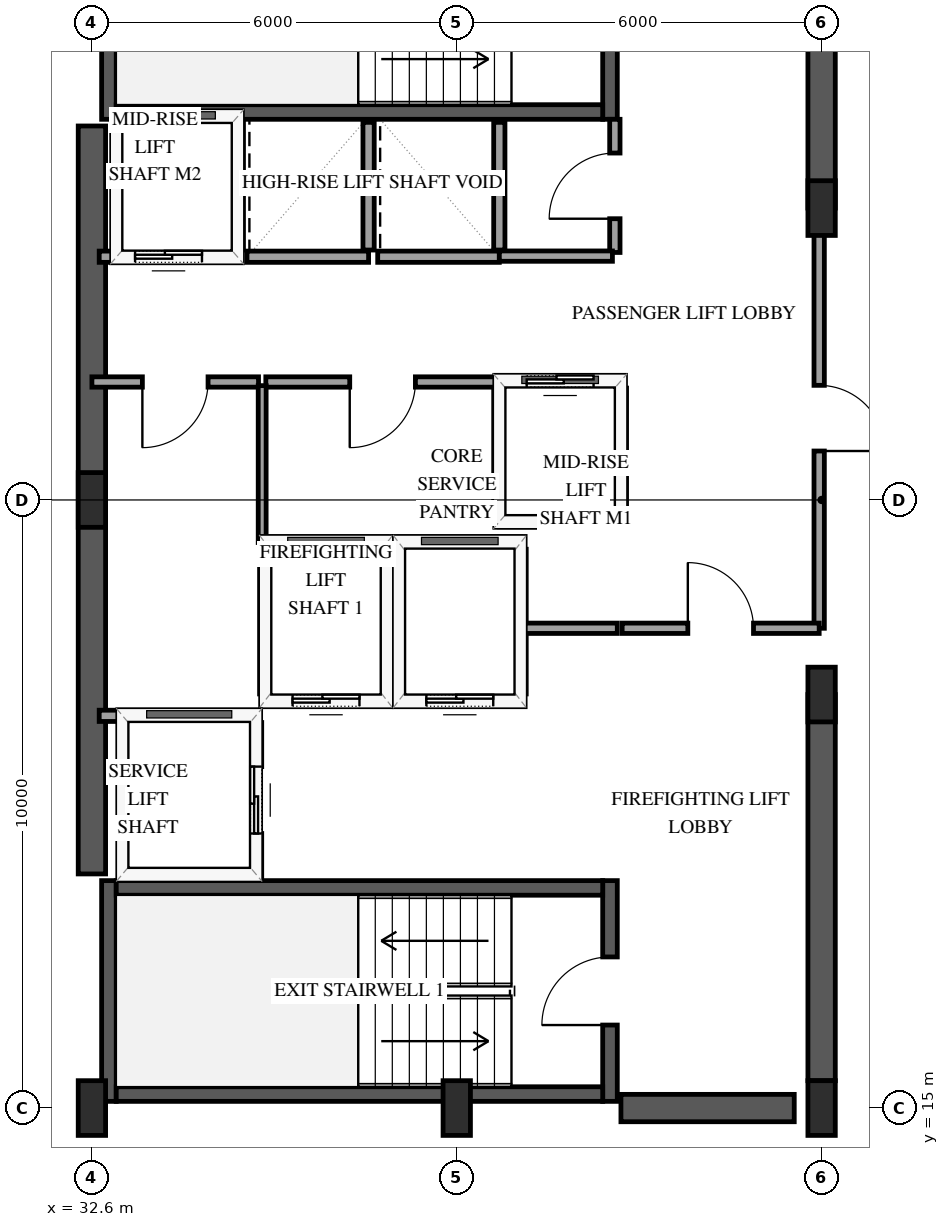
"""IFC4 building model, lengths in metres.
Left out: names, types, materials, properties, quantities, classifications, styles, units other than length and angle.
Written with IfcOpenShell. Run it as: python <this file> out.ifc"""

import sys

from ifc_helpers import new_model, si_unit, direction, frame, frame_2d, origin, origin_2d, place, context, subcontext, project, spatial, rectangle, extrude, element, fill, save


model = new_model("IFC4")
c1 = context("Model", 3, precision=1e-05, world=origin(), true_north=direction((0.0, 1.0)))
c2 = subcontext(c1, "Body", "Model", "MODEL_VIEW")
j1 = project(units=[si_unit("LENGTHUNIT", "METRE"), si_unit("PLANEANGLEUNIT", "RADIAN")], contexts=[c1])
p1 = place(None, origin())
s1 = spatial("IfcSite", under=j1, at=p1, CompositionType="ELEMENT")
p2 = place(p1, origin())
s2 = spatial("IfcBuilding", under=s1, at=p2, CompositionType="ELEMENT")
p3 = place(p2, frame((0.0, 0.0, 223.0)))
s3 = spatial("IfcBuildingStorey", under=s2, at=p3, CompositionType="ELEMENT", Elevation=223.0)
p4 = place(p3, frame((32.88, 15.11, 0.0), z_axis=(0.0, 0.0, 1.0), x_axis=(0.0, 1.0, 0.0)))
e1 = element("IfcWall", 1, at=p4, inside=s3, PredefinedType="SHEAR", context=c2, shape_type="SweptSolid", body=[
    extrude(rectangle(XDim=3.63, YDim=0.24, at=frame_2d((1.815, 0.0))), origin(), (0.0, 0.0, 1.0), 3.6),
])
p5 = place(p3, frame((41.12, 15.11, 0.0), z_axis=(0.0, 0.0, 1.0), x_axis=(0.0, 1.0, 0.0)))
e2 = element("IfcWall", 2, at=p5, inside=s3, PredefinedType="SHEAR", context=c2, shape_type="SweptSolid", body=[
    extrude(rectangle(XDim=3.63, YDim=0.24, at=frame_2d((1.815, 0.0))), origin(), (0.0, 0.0, 1.0), 3.6),
])
p6 = place(p5, frame((1.255, 0.0, 0.0)))
e3 = element("IfcOpeningElement", 3, at=p6, cuts=e2, PredefinedType="OPENING", context=c2, shape_type="SweptSolid", body=[
    extrude(rectangle(XDim=1.12, YDim=2.15, at=frame_2d((0.56, 1.075))), frame((0.0, 0.13, 0.0), z_axis=(0.0, -1.0, 0.0), x_axis=(1.0, 0.0, 0.0)), (0.0, 0.0, 1.0), 0.26),
])
for number, where, z_axis, x_axis in (
    (4, (33.0, 15.23, 0.0), (0.0, 0.0, 1.0), (1.0, 0.0, 0.0)),
    (5, (33.0, 18.62, 0.0), (0.0, 0.0, 1.0), (1.0, 0.0, 0.0)),
):
    element("IfcWall", number, at=place(p3, frame(where, z_axis=z_axis, x_axis=x_axis)), inside=s3, PredefinedType="SHEAR", context=c2, shape_type="SweptSolid", body=[
        extrude(rectangle(XDim=8.0, YDim=0.24, at=frame_2d((4.0, 0.0))), origin(), (0.0, 0.0, 1.0), 3.6),
    ])
p7 = place(p3, frame((32.88, 31.26, 0.0), z_axis=(0.0, 0.0, 1.0), x_axis=(0.0, 1.0, 0.0)))
e6 = element("IfcWall", 6, at=p7, inside=s3, PredefinedType="SHEAR", context=c2, shape_type="SweptSolid", body=[
    extrude(rectangle(XDim=3.63, YDim=0.24, at=frame_2d((1.815, 0.0))), origin(), (0.0, 0.0, 1.0), 3.6),
])
p8 = place(p3, frame((41.12, 31.26, 0.0), z_axis=(0.0, 0.0, 1.0), x_axis=(0.0, 1.0, 0.0)))
e7 = element("IfcWall", 7, at=p8, inside=s3, PredefinedType="SHEAR", context=c2, shape_type="SweptSolid", body=[
    extrude(rectangle(XDim=3.63, YDim=0.24, at=frame_2d((1.815, 0.0))), origin(), (0.0, 0.0, 1.0), 3.6),
])
p9 = place(p8, frame((1.255, 0.0, 0.0)))
e8 = element("IfcOpeningElement", 8, at=p9, cuts=e7, PredefinedType="OPENING", context=c2, shape_type="SweptSolid", body=[
    extrude(rectangle(XDim=1.12, YDim=2.15, at=frame_2d((0.56, 1.075))), frame((0.0, 0.13, 0.0), z_axis=(0.0, -1.0, 0.0), x_axis=(1.0, 0.0, 0.0)), (0.0, 0.0, 1.0), 0.26),
])
p10 = place(p3, frame((33.0, 31.38, 0.0), z_axis=(0.0, 0.0, 1.0), x_axis=(1.0, 0.0, 0.0)))
e9 = element("IfcWall", 9, at=p10, inside=s3, PredefinedType="SHEAR", context=c2, shape_type="SweptSolid", body=[
    extrude(rectangle(XDim=8.0, YDim=0.24, at=frame_2d((4.0, 0.0))), origin(), (0.0, 0.0, 1.0), 3.6),
])
p11 = place(p3, frame((32.6, 18.85, 0.0), z_axis=(0.0, 0.0, 1.0), x_axis=(0.0, 1.0, 0.0)))
e10 = element("IfcWall", 10, at=p11, inside=s3, PredefinedType="SHEAR", context=c2, shape_type="SweptSolid", body=[
    extrude(rectangle(XDim=12.3, YDim=0.45, at=frame_2d((6.15, 0.0))), origin(), (0.0, 0.0, 1.0), 3.6),
])
p12 = place(p3, frame((41.3, 15.0, 0.0), z_axis=(0.0, 0.0, 1.0), x_axis=(1.0, 0.0, 0.0)))
e11 = element("IfcWall", 11, at=p12, inside=s3, PredefinedType="SHEAR", context=c2, shape_type="SweptSolid", body=[
    extrude(rectangle(XDim=2.85, YDim=0.45, at=frame_2d((1.425, 0.0))), origin(), (0.0, 0.0, 1.0), 3.6),
])
p13 = place(p3, frame((44.6, 15.45, 0.0), z_axis=(0.0, 0.0, 1.0), x_axis=(0.0, 1.0, 0.0)))
e12 = element("IfcWall", 12, at=p13, inside=s3, PredefinedType="SHEAR", context=c2, shape_type="SweptSolid", body=[
    extrude(rectangle(XDim=6.35, YDim=0.45, at=frame_2d((3.175, 0.0))), origin(), (0.0, 0.0, 1.0), 3.6),
])
p14 = place(p3, frame((44.6, 29.8, 0.0), z_axis=(0.0, 0.0, 1.0), x_axis=(0.0, 1.0, 0.0)))
e13 = element("IfcWall", 13, at=p14, inside=s3, PredefinedType="SHEAR", context=c2, shape_type="SweptSolid", body=[
    extrude(rectangle(XDim=4.75, YDim=0.45, at=frame_2d((2.375, 0.0))), origin(), (0.0, 0.0, 1.0), 3.6),
])
for number, where, z_axis, x_axis in (
    (14, (32.6, 15.0, 0.0), (0.0, 0.0, 1.0), (1.0, 0.0, 0.0)),
    (15, (32.6, 25.0, 0.0), (0.0, 0.0, 1.0), (1.0, 0.0, 0.0)),
    (16, (38.6, 15.0, 0.0), (0.0, 0.0, 1.0), (1.0, 0.0, 0.0)),
    (17, (44.6, 15.0, 0.0), (0.0, 0.0, 1.0), (1.0, 0.0, 0.0)),
    (18, (44.6, 21.8, 0.0), (0.0, 0.0, 1.0), (1.0, 0.0, 0.0)),
    (19, (44.6, 29.8, 0.0), (0.0, 0.0, 1.0), (1.0, 0.0, 0.0)),
):
    element("IfcColumn", number, at=place(p3, frame(where, z_axis=z_axis, x_axis=x_axis)), inside=s3, PredefinedType="PILASTER", context=c2, shape_type="SweptSolid", body=[
        extrude(rectangle(XDim=0.45, YDim=0.9, at=origin_2d()), origin(), (0.0, 0.0, 1.0), 3.6),
    ])
p15 = place(p3, frame((35.45, 21.7, 0.0), z_axis=(0.0, 0.0, 1.0), x_axis=(1.0, 0.0, 0.0)))
e20 = element("IfcWall", 20, at=p15, inside=s3, PredefinedType="SOLIDWALL", context=c2, shape_type="SweptSolid", body=[
    extrude(rectangle(XDim=2.0, YDim=0.185, at=frame_2d((1.0, 0.0))), origin(), (0.0, 0.0, 1.0), 3.3),
])
p16 = place(p15, frame((0.45, 0.0, 0.0)))
e21 = element("IfcOpeningElement", 21, at=p16, cuts=e20, PredefinedType="OPENING", context=c2, shape_type="SweptSolid", body=[
    extrude(rectangle(XDim=1.1, YDim=2.15, at=frame_2d((0.55, 1.075))), frame((0.0, 0.103, 0.0), z_axis=(0.0, -1.0, 0.0), x_axis=(1.0, 0.0, 0.0)), (0.0, 0.0, 1.0), 0.205),
])
p17 = place(p3, frame((35.45, 24.3, 0.0), z_axis=(0.0, 0.0, 1.0), x_axis=(1.0, 0.0, 0.0)))
e22 = element("IfcWall", 22, at=p17, inside=s3, PredefinedType="SOLIDWALL", context=c2, shape_type="SweptSolid", body=[
    extrude(rectangle(XDim=2.0, YDim=0.185, at=frame_2d((1.0, 0.0))), origin(), (0.0, 0.0, 1.0), 3.3),
])
for number, where, z_axis, x_axis in (
    (23, (35.45, 21.81, 0.0), (0.0, 0.0, 1.0), (0.0, 1.0, 0.0)),
    (24, (37.45, 21.81, 0.0), (0.0, 0.0, 1.0), (0.0, 1.0, 0.0)),
):
    element("IfcWall", number, at=place(p3, frame(where, z_axis=z_axis, x_axis=x_axis)), inside=s3, PredefinedType="SOLIDWALL", context=c2, shape_type="SweptSolid", body=[
        extrude(rectangle(XDim=2.38, YDim=0.185, at=frame_2d((1.19, 0.0))), origin(), (0.0, 0.0, 1.0), 3.3),
    ])
p18 = place(p3, frame((37.65, 21.7, 0.0), z_axis=(0.0, 0.0, 1.0), x_axis=(1.0, 0.0, 0.0)))
e25 = element("IfcWall", 25, at=p18, inside=s3, PredefinedType="SOLIDWALL", context=c2, shape_type="SweptSolid", body=[
    extrude(rectangle(XDim=2.0, YDim=0.185, at=frame_2d((1.0, 0.0))), origin(), (0.0, 0.0, 1.0), 3.3),
])
p19 = place(p18, frame((0.45, 0.0, 0.0)))
e26 = element("IfcOpeningElement", 26, at=p19, cuts=e25, PredefinedType="OPENING", context=c2, shape_type="SweptSolid", body=[
    extrude(rectangle(XDim=1.1, YDim=2.15, at=frame_2d((0.55, 1.075))), frame((0.0, 0.103, 0.0), z_axis=(0.0, -1.0, 0.0), x_axis=(1.0, 0.0, 0.0)), (0.0, 0.0, 1.0), 0.205),
])
p20 = place(p3, frame((37.65, 24.3, 0.0), z_axis=(0.0, 0.0, 1.0), x_axis=(1.0, 0.0, 0.0)))
e27 = element("IfcWall", 27, at=p20, inside=s3, PredefinedType="SOLIDWALL", context=c2, shape_type="SweptSolid", body=[
    extrude(rectangle(XDim=2.0, YDim=0.185, at=frame_2d((1.0, 0.0))), origin(), (0.0, 0.0, 1.0), 3.3),
])
p21 = place(p3, frame((39.65, 21.81, 0.0), z_axis=(0.0, 0.0, 1.0), x_axis=(0.0, 1.0, 0.0)))
e28 = element("IfcWall", 28, at=p21, inside=s3, PredefinedType="SOLIDWALL", context=c2, shape_type="SweptSolid", body=[
    extrude(rectangle(XDim=2.38, YDim=0.185, at=frame_2d((1.19, 0.0))), origin(), (0.0, 0.0, 1.0), 3.3),
])
p22 = place(p3, frame((32.72, 21.45, 0.0), z_axis=(0.0, 0.0, 1.0), x_axis=(1.0, 0.0, 0.0)))
e29 = element("IfcWall", 29, at=p22, inside=s3, PredefinedType="SOLIDWALL", context=c2, shape_type="SweptSolid", body=[
    extrude(rectangle(XDim=2.58, YDim=0.185, at=frame_2d((1.29, 0.0))), origin(), (0.0, 0.0, 1.0), 3.3),
])
p23 = place(p3, frame((35.3, 18.79, 0.0), z_axis=(0.0, 0.0, 1.0), x_axis=(0.0, 1.0, 0.0)))
e30 = element("IfcWall", 30, at=p23, inside=s3, PredefinedType="SOLIDWALL", context=c2, shape_type="SweptSolid", body=[
    extrude(rectangle(XDim=2.55, YDim=0.185, at=frame_2d((1.275, 0.0))), origin(), (0.0, 0.0, 1.0), 3.3),
])
p24 = place(p23, frame((0.725, 0.0, 0.0)))
e31 = element("IfcOpeningElement", 31, at=p24, cuts=e30, PredefinedType="OPENING", context=c2, shape_type="SweptSolid", body=[
    extrude(rectangle(XDim=1.1, YDim=2.15, at=frame_2d((0.55, 1.075))), frame((0.0, 0.103, 0.0), z_axis=(0.0, -1.0, 0.0), x_axis=(1.0, 0.0, 0.0)), (0.0, 0.0, 1.0), 0.205),
])
p25 = place(p3, frame((39.3, 24.65, 0.0), z_axis=(0.0, 0.0, 1.0), x_axis=(1.0, 0.0, 0.0)))
e32 = element("IfcWall", 32, at=p25, inside=s3, PredefinedType="SOLIDWALL", context=c2, shape_type="SweptSolid", body=[
    extrude(rectangle(XDim=2.0, YDim=0.185, at=frame_2d((1.0, 0.0))), origin(), (0.0, 0.0, 1.0), 3.3),
])
p26 = place(p3, frame((39.3, 26.95, 0.0), z_axis=(0.0, 0.0, 1.0), x_axis=(1.0, 0.0, 0.0)))
e33 = element("IfcWall", 33, at=p26, inside=s3, PredefinedType="SOLIDWALL", context=c2, shape_type="SweptSolid", body=[
    extrude(rectangle(XDim=2.0, YDim=0.185, at=frame_2d((1.0, 0.0))), origin(), (0.0, 0.0, 1.0), 3.3),
])
p27 = place(p26, frame((0.45, 0.0, 0.0)))
e34 = element("IfcOpeningElement", 34, at=p27, cuts=e33, PredefinedType="OPENING", context=c2, shape_type="SweptSolid", body=[
    extrude(rectangle(XDim=1.1, YDim=2.15, at=frame_2d((0.55, 1.075))), frame((0.0, 0.103, 0.0), z_axis=(0.0, -1.0, 0.0), x_axis=(1.0, 0.0, 0.0)), (0.0, 0.0, 1.0), 0.205),
])
for number, where, z_axis, x_axis in (
    (35, (39.3, 24.76, 0.0), (0.0, 0.0, 1.0), (0.0, 1.0, 0.0)),
    (36, (41.3, 24.76, 0.0), (0.0, 0.0, 1.0), (0.0, 1.0, 0.0)),
):
    element("IfcWall", number, at=place(p3, frame(where, z_axis=z_axis, x_axis=x_axis)), inside=s3, PredefinedType="SOLIDWALL", context=c2, shape_type="SweptSolid", body=[
        extrude(rectangle(XDim=2.08, YDim=0.185, at=frame_2d((1.04, 0.0))), origin(), (0.0, 0.0, 1.0), 3.3),
    ])
p28 = place(p3, frame((32.72, 29.0, 0.0), z_axis=(0.0, 0.0, 1.0), x_axis=(1.0, 0.0, 0.0)))
e37 = element("IfcWall", 37, at=p28, inside=s3, PredefinedType="SOLIDWALL", context=c2, shape_type="SweptSolid", body=[
    extrude(rectangle(XDim=2.28, YDim=0.185, at=frame_2d((1.14, 0.0))), origin(), (0.0, 0.0, 1.0), 3.3),
])
p29 = place(p28, frame((0.59, 0.0, 0.0)))
e38 = element("IfcOpeningElement", 38, at=p29, cuts=e37, PredefinedType="OPENING", context=c2, shape_type="SweptSolid", body=[
    extrude(rectangle(XDim=1.1, YDim=2.15, at=frame_2d((0.55, 1.075))), frame((0.0, 0.103, 0.0), z_axis=(0.0, -1.0, 0.0), x_axis=(1.0, 0.0, 0.0)), (0.0, 0.0, 1.0), 0.205),
])
p30 = place(p3, frame((35.0, 29.11, 0.0), z_axis=(0.0, 0.0, 1.0), x_axis=(0.0, 1.0, 0.0)))
e39 = element("IfcWall", 39, at=p30, inside=s3, PredefinedType="SOLIDWALL", context=c2, shape_type="SweptSolid", body=[
    extrude(rectangle(XDim=2.1, YDim=0.185, at=frame_2d((1.05, 0.0))), origin(), (0.0, 0.0, 1.0), 3.3),
])
p31 = place(p3, frame((35.15, 29.0, 0.0), z_axis=(0.0, 0.0, 1.0), x_axis=(1.0, 0.0, 0.0)))
e40 = element("IfcWall", 40, at=p31, inside=s3, PredefinedType="SOLIDWALL", context=c2, shape_type="SweptSolid", body=[
    extrude(rectangle(XDim=2.0, YDim=0.185, at=frame_2d((1.0, 0.0))), origin(), (0.0, 0.0, 1.0), 3.3),
])
p32 = place(p3, frame((37.15, 29.11, 0.0), z_axis=(0.0, 0.0, 1.0), x_axis=(0.0, 1.0, 0.0)))
e41 = element("IfcWall", 41, at=p32, inside=s3, PredefinedType="SOLIDWALL", context=c2, shape_type="SweptSolid", body=[
    extrude(rectangle(XDim=2.1, YDim=0.185, at=frame_2d((1.05, 0.0))), origin(), (0.0, 0.0, 1.0), 3.3),
])
p33 = place(p3, frame((37.3, 29.0, 0.0), z_axis=(0.0, 0.0, 1.0), x_axis=(1.0, 0.0, 0.0)))
e42 = element("IfcWall", 42, at=p33, inside=s3, PredefinedType="SOLIDWALL", context=c2, shape_type="SweptSolid", body=[
    extrude(rectangle(XDim=2.0, YDim=0.185, at=frame_2d((1.0, 0.0))), origin(), (0.0, 0.0, 1.0), 3.3),
])
p34 = place(p3, frame((39.3, 29.11, 0.0), z_axis=(0.0, 0.0, 1.0), x_axis=(0.0, 1.0, 0.0)))
e43 = element("IfcWall", 43, at=p34, inside=s3, PredefinedType="SOLIDWALL", context=c2, shape_type="SweptSolid", body=[
    extrude(rectangle(XDim=2.1, YDim=0.185, at=frame_2d((1.05, 0.0))), origin(), (0.0, 0.0, 1.0), 3.3),
])
p35 = place(p3, frame((44.56, 29.8, 0.0), z_axis=(0.0, 0.0, 1.0), x_axis=(0.0, -1.0, 0.0)))
e44 = element("IfcWall", 44, at=p35, inside=s3, PredefinedType="PARTITIONING", context=c2, shape_type="SweptSolid", body=[
    extrude(rectangle(XDim=6.91, YDim=0.17, at=frame_2d((3.455, 0.0))), origin(), (0.0, 0.0, 1.0), 2.34),
])
p36 = place(p35, frame((2.915, 0.0, 0.0)))
e45 = element("IfcOpeningElement", 45, at=p36, cuts=e44, PredefinedType="OPENING", context=c2, shape_type="SweptSolid", body=[
    extrude(rectangle(XDim=1.08, YDim=2.15, at=frame_2d((0.54, 1.075))), frame((0.0, 0.095, 0.0), z_axis=(0.0, -1.0, 0.0), x_axis=(1.0, 0.0, 0.0)), (0.0, 0.0, 1.0), 0.19),
])
p37 = place(p3, frame((39.3, 26.94, 0.0), z_axis=(0.0, 0.0, 1.0), x_axis=(-1.0, 0.0, 0.0)))
e46 = element("IfcWall", 46, at=p37, inside=s3, PredefinedType="PARTITIONING", context=c2, shape_type="SweptSolid", body=[
    extrude(rectangle(XDim=3.84, YDim=0.17, at=frame_2d((1.92, 0.0))), origin(), (0.0, 0.0, 1.0), 3.3),
])
p38 = place(p37, frame((1.38, 0.0, 0.0)))
e47 = element("IfcOpeningElement", 47, at=p38, cuts=e46, PredefinedType="OPENING", context=c2, shape_type="SweptSolid", body=[
    extrude(rectangle(XDim=1.08, YDim=2.15, at=frame_2d((0.54, 1.075))), frame((0.0, 0.095, 0.0), z_axis=(0.0, -1.0, 0.0), x_axis=(1.0, 0.0, 0.0)), (0.0, 0.0, 1.0), 0.19),
])
p39 = place(p3, frame((41.32, 22.89, 0.0), z_axis=(0.0, 0.0, 1.0), x_axis=(1.0, 0.0, 0.0)))
e48 = element("IfcWall", 48, at=p39, inside=s3, PredefinedType="PARTITIONING", context=c2, shape_type="SweptSolid", body=[
    extrude(rectangle(XDim=3.24, YDim=0.17, at=frame_2d((1.62, 0.0))), origin(), (0.0, 0.0, 1.0), 3.3),
])
p40 = place(p39, frame((1.08, 0.0, 0.0)))
e49 = element("IfcOpeningElement", 49, at=p40, cuts=e48, PredefinedType="OPENING", context=c2, shape_type="SweptSolid", body=[
    extrude(rectangle(XDim=1.08, YDim=2.15, at=frame_2d((0.54, 1.075))), frame((0.0, 0.095, 0.0), z_axis=(0.0, -1.0, 0.0), x_axis=(1.0, 0.0, 0.0)), (0.0, 0.0, 1.0), 0.19),
])
p41 = place(p3, frame((35.34, 26.94, 0.0), z_axis=(0.0, 0.0, 1.0), x_axis=(-1.0, 0.0, 0.0)))
e50 = element("IfcWall", 50, at=p41, inside=s3, PredefinedType="PARTITIONING", context=c2, shape_type="SweptSolid", body=[
    extrude(rectangle(XDim=2.74, YDim=0.17, at=frame_2d((1.37, 0.0))), origin(), (0.0, 0.0, 1.0), 3.3),
])
p42 = place(p41, frame((0.83, 0.0, 0.0)))
e51 = element("IfcOpeningElement", 51, at=p42, cuts=e50, PredefinedType="OPENING", context=c2, shape_type="SweptSolid", body=[
    extrude(rectangle(XDim=1.08, YDim=2.15, at=frame_2d((0.54, 1.075))), frame((0.0, 0.095, 0.0), z_axis=(0.0, -1.0, 0.0), x_axis=(1.0, 0.0, 0.0)), (0.0, 0.0, 1.0), 0.19),
])
p43 = place(p3, frame((35.4, 26.88, 0.0), z_axis=(0.0, 0.0, 1.0), x_axis=(0.0, -1.0, 0.0)))
e52 = element("IfcWall", 52, at=p43, inside=s3, PredefinedType="PARTITIONING", context=c2, shape_type="SweptSolid", body=[
    extrude(rectangle(XDim=2.58, YDim=0.13, at=frame_2d((1.29, 0.0))), origin(), (0.0, 0.0, 1.0), 3.3),
])
p44 = place(p3, frame((41.2, 29.07, 0.0), z_axis=(0.0, 0.0, 1.0), x_axis=(0.0, 1.0, 0.0)))
e53 = element("IfcWall", 53, at=p44, inside=s3, PredefinedType="PARTITIONING", context=c2, shape_type="SweptSolid", body=[
    extrude(rectangle(XDim=2.19, YDim=0.17, at=frame_2d((1.095, 0.0))), origin(), (0.0, 0.0, 1.0), 3.3),
])
p45 = place(p44, frame((0.555, 0.0, 0.0)))
e54 = element("IfcOpeningElement", 54, at=p45, cuts=e53, PredefinedType="OPENING", context=c2, shape_type="SweptSolid", body=[
    extrude(rectangle(XDim=1.08, YDim=2.15, at=frame_2d((0.54, 1.075))), frame((0.0, 0.095, 0.0), z_axis=(0.0, -1.0, 0.0), x_axis=(1.0, 0.0, 0.0)), (0.0, 0.0, 1.0), 0.19),
])
p46 = place(p3, frame((39.3, 29.01, 0.0), z_axis=(0.0, 0.0, 1.0), x_axis=(1.0, 0.0, 0.0)))
e55 = element("IfcWall", 55, at=p46, inside=s3, PredefinedType="PARTITIONING", context=c2, shape_type="SweptSolid", body=[
    extrude(rectangle(XDim=1.86, YDim=0.17, at=frame_2d((0.93, 0.0))), origin(), (0.0, 0.0, 1.0), 3.3),
])
p47 = place(p3, frame((39.72, 22.89, 0.0), z_axis=(0.0, 0.0, 1.0), x_axis=(1.0, 0.0, 0.0)))
e56 = element("IfcWall", 56, at=p47, inside=s3, PredefinedType="PARTITIONING", context=c2, shape_type="SweptSolid", body=[
    extrude(rectangle(XDim=1.52, YDim=0.17, at=frame_2d((0.76, 0.0))), origin(), (0.0, 0.0, 1.0), 3.3),
])
p48 = place(p16, origin())
e57 = element("IfcDoor", 57, at=p48, inside=s3, OperationType="SLIDING_TO_LEFT", PredefinedType="DOOR", context=c2, shape_type="SweptSolid", body=[
    extrude(rectangle(XDim=1.1, YDim=2.15, at=frame_2d((0.55, 1.075))), frame((0.0, 0.025, 0.0), z_axis=(0.0, -1.0, 0.0), x_axis=(1.0, 0.0, 0.0)), (0.0, 0.0, 1.0), 0.05),
])
fill(e21, e57)
p49 = place(p19, origin())
e58 = element("IfcDoor", 58, at=p49, inside=s3, OperationType="SLIDING_TO_LEFT", PredefinedType="DOOR", context=c2, shape_type="SweptSolid", body=[
    extrude(rectangle(XDim=1.1, YDim=2.15, at=frame_2d((0.55, 1.075))), frame((0.0, 0.025, 0.0), z_axis=(0.0, -1.0, 0.0), x_axis=(1.0, 0.0, 0.0)), (0.0, 0.0, 1.0), 0.05),
])
fill(e26, e58)
p50 = place(p24, origin())
e59 = element("IfcDoor", 59, at=p50, inside=s3, OperationType="SLIDING_TO_LEFT", PredefinedType="DOOR", context=c2, shape_type="SweptSolid", body=[
    extrude(rectangle(XDim=1.1, YDim=2.15, at=frame_2d((0.55, 1.075))), frame((0.0, 0.025, 0.0), z_axis=(0.0, -1.0, 0.0), x_axis=(1.0, 0.0, 0.0)), (0.0, 0.0, 1.0), 0.05),
])
fill(e31, e59)
p51 = place(p27, origin())
e60 = element("IfcDoor", 60, at=p51, inside=s3, OperationType="SLIDING_TO_LEFT", PredefinedType="DOOR", context=c2, shape_type="SweptSolid", body=[
    extrude(rectangle(XDim=1.1, YDim=2.15, at=frame_2d((0.55, 1.075))), frame((0.0, 0.025, 0.0), z_axis=(0.0, -1.0, 0.0), x_axis=(1.0, 0.0, 0.0)), (0.0, 0.0, 1.0), 0.05),
])
fill(e34, e60)
p52 = place(p29, origin())
e61 = element("IfcDoor", 61, at=p52, inside=s3, OperationType="SLIDING_TO_LEFT", PredefinedType="DOOR", context=c2, shape_type="SweptSolid", body=[
    extrude(rectangle(XDim=1.1, YDim=2.15, at=frame_2d((0.55, 1.075))), frame((0.0, 0.025, 0.0), z_axis=(0.0, -1.0, 0.0), x_axis=(1.0, 0.0, 0.0)), (0.0, 0.0, 1.0), 0.05),
])
fill(e38, e61)
p53 = place(p6, origin())
e62 = element("IfcDoor", 62, at=p53, inside=s3, OperationType="SINGLE_SWING_LEFT", PredefinedType="DOOR", context=c2, shape_type="SweptSolid", body=[
    extrude(rectangle(XDim=1.12, YDim=2.15, at=frame_2d((0.56, 1.075))), frame((0.0, 0.025, 0.0), z_axis=(0.0, -1.0, 0.0), x_axis=(1.0, 0.0, 0.0)), (0.0, 0.0, 1.0), 0.05),
])
fill(e3, e62)
p54 = place(p36, origin())
e63 = element("IfcDoor", 63, at=p54, inside=s3, OperationType="SINGLE_SWING_RIGHT", PredefinedType="DOOR", context=c2, shape_type="SweptSolid", body=[
    extrude(rectangle(XDim=1.08, YDim=2.15, at=frame_2d((0.54, 1.075))), frame((0.0, 0.025, 0.0), z_axis=(0.0, -1.0, 0.0), x_axis=(1.0, 0.0, 0.0)), (0.0, 0.0, 1.0), 0.05),
])
fill(e45, e63)
p55 = place(p38, origin())
e64 = element("IfcDoor", 64, at=p55, inside=s3, OperationType="SINGLE_SWING_RIGHT", PredefinedType="DOOR", context=c2, shape_type="SweptSolid", body=[
    extrude(rectangle(XDim=1.08, YDim=2.15, at=frame_2d((0.54, 1.075))), frame((0.0, 0.025, 0.0), z_axis=(0.0, -1.0, 0.0), x_axis=(1.0, 0.0, 0.0)), (0.0, 0.0, 1.0), 0.05),
])
fill(e47, e64)
p56 = place(p40, origin())
e65 = element("IfcDoor", 65, at=p56, inside=s3, OperationType="SINGLE_SWING_LEFT", PredefinedType="DOOR", context=c2, shape_type="SweptSolid", body=[
    extrude(rectangle(XDim=1.08, YDim=2.15, at=frame_2d((0.54, 1.075))), frame((0.0, 0.025, 0.0), z_axis=(0.0, -1.0, 0.0), x_axis=(1.0, 0.0, 0.0)), (0.0, 0.0, 1.0), 0.05),
])
fill(e49, e65)
p57 = place(p42, origin())
e66 = element("IfcDoor", 66, at=p57, inside=s3, OperationType="SINGLE_SWING_RIGHT", PredefinedType="DOOR", context=c2, shape_type="SweptSolid", body=[
    extrude(rectangle(XDim=1.08, YDim=2.15, at=frame_2d((0.54, 1.075))), frame((0.0, 0.025, 0.0), z_axis=(0.0, -1.0, 0.0), x_axis=(1.0, 0.0, 0.0)), (0.0, 0.0, 1.0), 0.05),
])
fill(e51, e66)
p58 = place(p45, origin())
e67 = element("IfcDoor", 67, at=p58, inside=s3, OperationType="SINGLE_SWING_LEFT", PredefinedType="DOOR", context=c2, shape_type="SweptSolid", body=[
    extrude(rectangle(XDim=1.08, YDim=2.15, at=frame_2d((0.54, 1.075))), frame((0.0, 0.025, 0.0), z_axis=(0.0, -1.0, 0.0), x_axis=(1.0, 0.0, 0.0)), (0.0, 0.0, 1.0), 0.05),
])
fill(e54, e67)
save(model, sys.argv[1])
